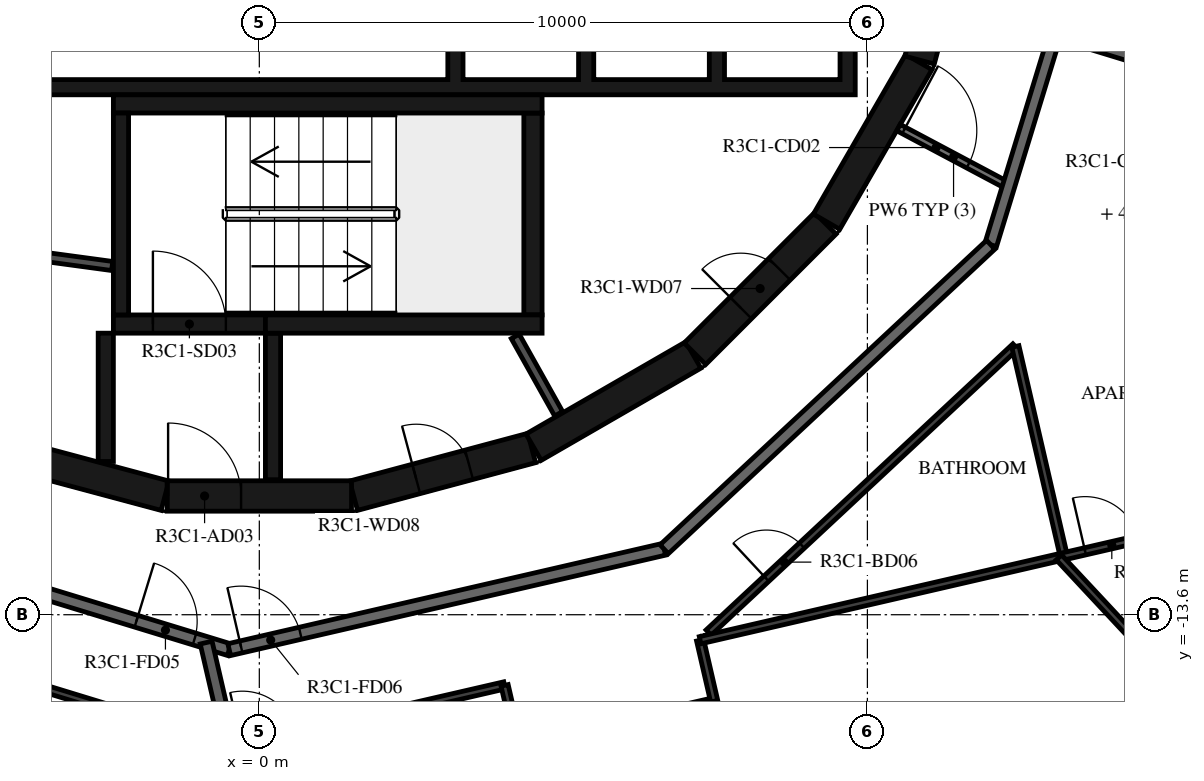
"""IFC4 building model, lengths in metres.
Left out: names, types, materials, properties, quantities, classifications, styles, units other than length and angle.
Written with IfcOpenShell. Run it as: python <this file> out.ifc"""

import sys

from ifc_helpers import new_model, si_unit, direction, frame, frame_2d, origin, place, context, subcontext, project, spatial, polyline, rectangle, outline, extrude, element, fill, save


model = new_model("IFC4")
c1 = context("Model", 3, precision=1e-05, world=origin(), true_north=direction((0.0, 1.0)))
c2 = subcontext(c1, "Body", "Model", "MODEL_VIEW")
j1 = project(units=[si_unit("LENGTHUNIT", "METRE"), si_unit("PLANEANGLEUNIT", "RADIAN")], contexts=[c1])
p1 = place(None, origin())
s1 = spatial("IfcSite", under=j1, at=p1, CompositionType="ELEMENT")
p2 = place(p1, origin())
s2 = spatial("IfcBuilding", under=s1, at=p2, CompositionType="ELEMENT")
p3 = place(p2, frame((0.0, 0.0, 137.9)))
s3 = spatial("IfcBuildingStorey", under=s2, at=p3, CompositionType="ELEMENT", Elevation=137.9)
p4 = place(p3, frame((1.55, -11.643, 0.0), z_axis=(0.0, 0.0, 1.0), x_axis=(0.965948410781, 0.258734743916, 0.0)))
e1 = element("IfcWall", 1, at=p4, inside=s3, PredefinedType="SHEAR", context=c2, shape_type="SweptSolid", body=[
    extrude(rectangle(XDim=3.033, YDim=0.5, at=frame_2d((1.516, 0.0))), origin(), (0.0, 0.0, 1.0), 3.12),
])
p5 = place(p4, frame((1.066, 0.0, 0.0)))
e2 = element("IfcOpeningElement", 2, at=p5, cuts=e1, PredefinedType="OPENING", context=c2, shape_type="SweptSolid", body=[
    extrude(rectangle(XDim=0.9, YDim=2.1, at=frame_2d((0.45, 1.05))), frame((0.0, 0.26, 0.0), z_axis=(0.0, -1.0, 0.0), x_axis=(1.0, 0.0, 0.0)), (0.0, 0.0, 1.0), 0.52),
])
p6 = place(p3, frame((4.51, -10.845, 0.0), z_axis=(0.0, 0.0, 1.0), x_axis=(0.865975092491, 0.500087131594, 0.0)))
e3 = element("IfcWall", 3, at=p6, inside=s3, PredefinedType="SHEAR", context=c2, shape_type="SweptSolid", body=[
    extrude(rectangle(XDim=3.033, YDim=0.5, at=frame_2d((1.516, 0.0))), origin(), (0.0, 0.0, 1.0), 3.12),
])
p7 = place(p3, frame((7.164, -9.308, 0.0), z_axis=(0.0, 0.0, 1.0), x_axis=(0.707106781187, 0.707106781187, 0.0)))
e4 = element("IfcWall", 4, at=p7, inside=s3, PredefinedType="SHEAR", context=c2, shape_type="SweptSolid", body=[
    extrude(rectangle(XDim=3.032, YDim=0.5, at=frame_2d((1.516, 0.0))), origin(), (0.0, 0.0, 1.0), 3.12),
])
p8 = place(p7, frame((1.066, 0.0, 0.0)))
e5 = element("IfcOpeningElement", 5, at=p8, cuts=e4, PredefinedType="OPENING", context=c2, shape_type="SweptSolid", body=[
    extrude(rectangle(XDim=0.9, YDim=2.1, at=frame_2d((0.45, 1.05))), frame((0.0, 0.26, 0.0), z_axis=(0.0, -1.0, 0.0), x_axis=(1.0, 0.0, 0.0)), (0.0, 0.0, 1.0), 0.52),
])
for number, where, z_axis, x_axis in (
    (6, (9.329, -7.137, 0.0), (0.0, 0.0, 1.0), (0.5, 0.866, 0.0)),
    (7, (10.858, -4.479, 0.0), (0.0, 0.0, 1.0), (0.259, 0.966, 0.0)),
    (8, (-4.479, -10.858, 0.0), (0.0, 0.0, 1.0), (0.966, -0.259, 0.0)),
):
    element("IfcWall", number, at=place(p3, frame(where, z_axis=z_axis, x_axis=x_axis)), inside=s3, PredefinedType="SHEAR", context=c2, shape_type="SweptSolid", body=[
        extrude(rectangle(XDim=3.033, YDim=0.5, at=frame_2d((1.516, 0.0))), origin(), (0.0, 0.0, 1.0), 3.12),
    ])
p9 = place(p3, frame((-1.516, -11.647, 0.0), z_axis=(0.0, 0.0, 1.0), x_axis=(1.0, 0.0, 0.0)))
e9 = element("IfcWall", 9, at=p9, inside=s3, PredefinedType="SHEAR", context=c2, shape_type="SweptSolid", body=[
    extrude(rectangle(XDim=3.033, YDim=0.5, at=frame_2d((1.516, 0.0))), origin(), (0.0, 0.0, 1.0), 3.12),
])
p10 = place(p9, frame((0.016, 0.0, 0.0)))
e10 = element("IfcOpeningElement", 10, at=p10, cuts=e9, PredefinedType="OPENING", context=c2, shape_type="SweptSolid", body=[
    extrude(rectangle(XDim=1.2, YDim=2.1, at=frame_2d((0.6, 1.05))), frame((0.0, 0.26, 0.0), z_axis=(0.0, -1.0, 0.0), x_axis=(1.0, 0.0, 0.0)), (0.0, 0.0, 1.0), 0.52),
])
p11 = place(p3, frame((-2.275, -8.67, 0.0), z_axis=(0.0, 0.0, 1.0), x_axis=(0.0, 1.0, 0.0)))
e11 = element("IfcWall", 11, at=p11, inside=s3, PredefinedType="SHEAR", context=c2, shape_type="SweptSolid", body=[
    extrude(rectangle(XDim=3.32, YDim=0.25, at=frame_2d((1.66, 0.0))), origin(), (0.0, 0.0, 1.0), 3.12),
])
p12 = place(p3, frame((-2.4, -5.2, 0.0), z_axis=(0.0, 0.0, 1.0), x_axis=(1.0, 0.0, 0.0)))
e12 = element("IfcWall", 12, at=p12, inside=s3, PredefinedType="SHEAR", context=c2, shape_type="SweptSolid", body=[
    extrude(rectangle(XDim=7.05, YDim=0.3, at=frame_2d((3.525, 0.0))), origin(), (0.0, 0.0, 1.0), 3.12),
])
p13 = place(p3, frame((4.5, -8.67, 0.0), z_axis=(0.0, 0.0, 1.0), x_axis=(0.0, 1.0, 0.0)))
e13 = element("IfcWall", 13, at=p13, inside=s3, PredefinedType="SHEAR", context=c2, shape_type="SweptSolid", body=[
    extrude(rectangle(XDim=3.32, YDim=0.3, at=frame_2d((1.66, 0.0))), origin(), (0.0, 0.0, 1.0), 3.12),
])
p14 = place(p3, frame((0.1, -8.82, 0.0), z_axis=(0.0, 0.0, 1.0), x_axis=(1.0, 0.0, 0.0)))
e14 = element("IfcWall", 14, at=p14, inside=s3, PredefinedType="SHEAR", context=c2, shape_type="SweptSolid", body=[
    extrude(rectangle(XDim=4.55, YDim=0.3, at=frame_2d((2.275, 0.0))), origin(), (0.0, 0.0, 1.0), 3.12),
])
p15 = place(p3, frame((-2.4, -8.82, 0.0), z_axis=(0.0, 0.0, 1.0), x_axis=(1.0, 0.0, 0.0)))
e15 = element("IfcWall", 15, at=p15, inside=s3, PredefinedType="SHEAR", context=c2, shape_type="SweptSolid", body=[
    extrude(rectangle(XDim=2.5, YDim=0.3, at=frame_2d((1.25, 0.0))), origin(), (0.0, 0.0, 1.0), 3.12),
])
p16 = place(p15, frame((0.65, 0.0, 0.0)))
e16 = element("IfcOpeningElement", 16, at=p16, cuts=e15, PredefinedType="OPENING", context=c2, shape_type="SweptSolid", body=[
    extrude(rectangle(XDim=1.2, YDim=2.1, at=frame_2d((0.6, 1.05))), frame((0.0, 0.16, 0.0), z_axis=(0.0, -1.0, 0.0), x_axis=(1.0, 0.0, 0.0)), (0.0, 0.0, 1.0), 0.32),
])
p17 = place(p3, frame((-2.525, -8.97, 0.0), z_axis=(0.0, 0.0, 1.0), x_axis=(0.0, -1.0, 0.0)))
e17 = element("IfcWall", 17, at=p17, inside=s3, PredefinedType="SHEAR", context=c2, shape_type="SweptSolid", body=[
    extrude(rectangle(XDim=2.11, YDim=0.25, at=frame_2d((1.055, 0.0))), origin(), (0.0, 0.0, 1.0), 3.12),
])
p18 = place(p3, frame((0.225, -8.97, 0.0), z_axis=(0.0, 0.0, 1.0), x_axis=(0.0, -1.0, 0.0)))
e18 = element("IfcWall", 18, at=p18, inside=s3, PredefinedType="SHEAR", context=c2, shape_type="SweptSolid", body=[
    extrude(rectangle(XDim=2.41, YDim=0.25, at=frame_2d((1.205, 0.0))), origin(), (0.0, 0.0, 1.0), 3.12),
])
p19 = place(p3, origin())
e19 = element("IfcWall", 19, at=p19, inside=s3, PredefinedType="SHEAR", context=c2, shape_type="SweptSolid", body=[
    extrude(outline(polyline([(9.8, -5.05), (9.8, -4.8), (9.8, -1.9), (9.55, -1.9), (9.55, -4.8), (7.65, -4.8), (7.65, -1.9), (7.4, -1.9), (7.4, -4.8), (5.5, -4.8), (5.5, -1.9), (5.25, -1.9), (5.25, -4.8), (3.35, -4.8), (3.35, -1.9), (3.1, -1.9), (3.1, -4.8), (-5.25, -4.8), (-5.25, -1.9), (-5.5, -1.9), (-5.5, -4.8), (-7.4, -4.8), (-7.4, -1.9), (-7.65, -1.9), (-7.65, -4.8), (-9.55, -4.8), (-9.55, -1.9), (-9.8, -1.9), (-9.8, -4.8), (-9.8, -5.05), (9.8, -5.05)])), origin(), (0.0, 0.0, 1.0), 3.12),
])
p20 = place(p3, frame((4.922, -10.296, 0.0), z_axis=(0.0, 0.0, 1.0), x_axis=(-0.48860846254, 0.872503163509, 0.0)))
e20 = element("IfcWall", 20, at=p20, inside=s3, PredefinedType="PARTITIONING", context=c2, shape_type="SweptSolid", body=[
    extrude(rectangle(XDim=1.459, YDim=0.15, at=frame_2d((0.73, 0.0))), origin(), (0.0, 0.0, 1.0), 3.12),
])
p21 = place(p3, frame((-2.42, -7.865, 0.0), z_axis=(0.0, 0.0, 1.0), x_axis=(-0.990972299108, 0.134066783362, 0.0)))
e21 = element("IfcWall", 21, at=p21, inside=s3, PredefinedType="PARTITIONING", context=c2, shape_type="SweptSolid", body=[
    extrude(rectangle(XDim=2.176, YDim=0.15, at=frame_2d((1.088, 0.0))), origin(), (0.0, 0.0, 1.0), 3.12),
])
p22 = place(p3, frame((10.511, -5.589, 0.0), z_axis=(0.0, 0.0, 1.0), x_axis=(0.882987820808, -0.469395897196, 0.0)))
e22 = element("IfcWall", 22, at=p22, inside=s3, PredefinedType="PARTITIONING", context=c2, shape_type="SweptSolid", body=[
    extrude(rectangle(XDim=2.052, YDim=0.12, at=frame_2d((1.026, 0.0))), origin(), (0.0, 0.0, 1.0), 3.12),
])
p23 = place(p22, frame((0.1, 0.0, 0.0)))
e23 = element("IfcOpeningElement", 23, at=p23, cuts=e22, PredefinedType="OPENING", context=c2, shape_type="SweptSolid", body=[
    extrude(rectangle(XDim=1.2, YDim=2.1, at=frame_2d((0.6, 1.05))), frame((0.0, 0.07, 0.0), z_axis=(0.0, -1.0, 0.0), x_axis=(1.0, 0.0, 0.0)), (0.0, 0.0, 1.0), 0.14),
])
p24 = place(p3, frame((12.028, -7.516, 0.0), z_axis=(0.0, 0.0, 1.0), x_axis=(0.292365533182, 0.956306642771, 0.0)))
e24 = element("IfcWall", 24, at=p24, inside=s3, PredefinedType="STANDARD", context=c2, shape_type="SweptSolid", body=[
    extrude(rectangle(XDim=7.342, YDim=0.2, at=frame_2d((3.671, 0.0))), origin(), (0.0, 0.0, 1.0), 3.12),
])
p25 = place(p3, frame((-7.516, -12.028, 0.0), z_axis=(0.0, 0.0, 1.0), x_axis=(0.956306642771, -0.292365533182, 0.0)))
e25 = element("IfcWall", 25, at=p25, inside=s3, PredefinedType="STANDARD", context=c2, shape_type="SweptSolid", body=[
    extrude(rectangle(XDim=7.342, YDim=0.2, at=frame_2d((3.671, 0.0))), origin(), (0.0, 0.0, 1.0), 3.12),
])
p26 = place(p25, frame((5.745, 0.0, 0.0)))
e26 = element("IfcOpeningElement", 26, at=p26, cuts=e25, PredefinedType="OPENING", context=c2, shape_type="SweptSolid", body=[
    extrude(rectangle(XDim=1.0, YDim=2.1, at=frame_2d((0.5, 1.05))), frame((0.0, 0.11, 0.0), z_axis=(0.0, -1.0, 0.0), x_axis=(1.0, 0.0, 0.0)), (0.0, 0.0, 1.0), 0.22),
])
p27 = place(p3, frame((-0.495, -14.175, 0.0), z_axis=(0.0, 0.0, 1.0), x_axis=(0.974376622151, 0.224922649383, 0.0)))
e27 = element("IfcWall", 27, at=p27, inside=s3, PredefinedType="STANDARD", context=c2, shape_type="SweptSolid", body=[
    extrude(rectangle(XDim=7.342, YDim=0.2, at=frame_2d((3.671, 0.0))), origin(), (0.0, 0.0, 1.0), 3.12),
])
p28 = place(p27, frame((0.2, 0.0, 0.0)))
e28 = element("IfcOpeningElement", 28, at=p28, cuts=e27, PredefinedType="OPENING", context=c2, shape_type="SweptSolid", body=[
    extrude(rectangle(XDim=1.0, YDim=2.1, at=frame_2d((0.5, 1.05))), frame((0.0, 0.11, 0.0), z_axis=(0.0, -1.0, 0.0), x_axis=(1.0, 0.0, 0.0)), (0.0, 0.0, 1.0), 0.22),
])
p29 = place(p3, frame((6.659, -12.523, 0.0), z_axis=(0.0, 0.0, 1.0), x_axis=(0.731350455479, 0.682001841105, 0.0)))
e29 = element("IfcWall", 29, at=p29, inside=s3, PredefinedType="STANDARD", context=c2, shape_type="SweptSolid", body=[
    extrude(rectangle(XDim=7.342, YDim=0.2, at=frame_2d((3.671, 0.0))), origin(), (0.0, 0.0, 1.0), 3.12),
])
p30 = place(p3, frame((13.095, -4.026, 0.0), z_axis=(0.0, 0.0, 1.0), x_axis=(0.956303942966, -0.292374363904, 0.0)))
e30 = element("IfcWall", 30, at=p30, inside=s3, PredefinedType="STANDARD", context=c2, shape_type="SweptSolid", body=[
    extrude(rectangle(XDim=6.567, YDim=0.2, at=frame_2d((3.284, 0.0))), origin(), (0.0, 0.0, 1.0), 3.12),
])
p31 = place(p3, frame((-0.492, -15.713, 0.0), z_axis=(0.0, 0.0, 1.0), x_axis=(-0.224974992875, 0.97436453783, 0.0)))
e31 = element("IfcWall", 31, at=p31, inside=s3, PredefinedType="STANDARD", context=c2, shape_type="SweptSolid", body=[
    extrude(rectangle(XDim=1.698, YDim=0.2, at=frame_2d((0.849, 0.0))), origin(), (0.0, 0.0, 1.0), 3.12),
])
p32 = place(p3, frame((-7.804, -13.509, 0.0), z_axis=(0.0, 0.0, 1.0), x_axis=(0.956309088343, -0.292357533772, 0.0)))
e32 = element("IfcWall", 32, at=p32, inside=s3, PredefinedType="PARTITIONING", context=c2, shape_type="SweptSolid", body=[
    extrude(rectangle(XDim=7.586, YDim=0.12, at=frame_2d((3.793, 0.0))), origin(), (0.0, 0.0, 1.0), 3.12),
])
p33 = place(p32, frame((1.006, 0.0, 0.0)))
e33 = element("IfcOpeningElement", 33, at=p33, cuts=e32, PredefinedType="OPENING", context=c2, shape_type="SweptSolid", body=[
    extrude(rectangle(XDim=0.8, YDim=2.1, at=frame_2d((0.4, 1.05))), frame((0.0, 0.07, 0.0), z_axis=(0.0, -1.0, 0.0), x_axis=(1.0, 0.0, 0.0)), (0.0, 0.0, 1.0), 0.14),
])
p34 = place(p3, frame((-14.736, -19.095, 0.0), z_axis=(0.0, 0.0, 1.0), x_axis=(0.974368335243, 0.224958545682, 0.0)))
e34 = element("IfcWall", 34, at=p34, inside=s3, PredefinedType="PARTITIONING", context=c2, shape_type="SweptSolid", body=[
    extrude(rectangle(XDim=19.263, YDim=0.12, at=frame_2d((9.632, 0.0))), origin(), (0.0, 0.0, 1.0), 3.12),
])
p35 = place(p34, frame((2.993, 0.0, 0.0)))
e35 = element("IfcOpeningElement", 35, at=p35, cuts=e34, PredefinedType="OPENING", context=c2, shape_type="SweptSolid", body=[
    extrude(rectangle(XDim=0.9, YDim=2.1, at=frame_2d((0.45, 1.05))), frame((0.0, 0.07, 0.0), z_axis=(0.0, -1.0, 0.0), x_axis=(1.0, 0.0, 0.0)), (0.0, 0.0, 1.0), 0.14),
])
p36 = place(p34, frame((6.81, 0.0, 0.0)))
e36 = element("IfcOpeningElement", 36, at=p36, cuts=e34, PredefinedType="OPENING", context=c2, shape_type="SweptSolid", body=[
    extrude(rectangle(XDim=0.9, YDim=2.1, at=frame_2d((0.45, 1.05))), frame((0.0, 0.07, 0.0), z_axis=(0.0, -1.0, 0.0), x_axis=(1.0, 0.0, 0.0)), (0.0, 0.0, 1.0), 0.14),
])
p37 = place(p34, frame((0.2, 0.0, 0.0)))
e37 = element("IfcOpeningElement", 37, at=p37, cuts=e34, PredefinedType="OPENING", context=c2, shape_type="SweptSolid", body=[
    extrude(rectangle(XDim=0.9, YDim=2.1, at=frame_2d((0.45, 1.05))), frame((0.0, 0.07, 0.0), z_axis=(0.0, -1.0, 0.0), x_axis=(1.0, 0.0, 0.0)), (0.0, 0.0, 1.0), 0.14),
])
p38 = place(p34, frame((14.839, 0.0, 0.0)))
e38 = element("IfcOpeningElement", 38, at=p38, cuts=e34, PredefinedType="OPENING", context=c2, shape_type="SweptSolid", body=[
    extrude(rectangle(XDim=0.9, YDim=2.1, at=frame_2d((0.45, 1.05))), frame((0.0, 0.07, 0.0), z_axis=(0.0, -1.0, 0.0), x_axis=(1.0, 0.0, 0.0)), (0.0, 0.0, 1.0), 0.14),
])
p39 = place(p3, frame((4.034, -14.762, 0.0), z_axis=(0.0, 0.0, 1.0), x_axis=(0.224859506699, -0.974391195695, 0.0)))
e39 = element("IfcWall", 39, at=p39, inside=s3, PredefinedType="PARTITIONING", context=c2, shape_type="SweptSolid", body=[
    extrude(rectangle(XDim=1.029, YDim=0.12, at=frame_2d((0.515, 0.0))), origin(), (0.0, 0.0, 1.0), 3.12),
])
p40 = place(p3, frame((4.265, -15.765, 0.0), z_axis=(0.0, 0.0, 1.0), x_axis=(0.974382467056, 0.22489732745, 0.0)))
e40 = element("IfcWall", 40, at=p40, inside=s3, PredefinedType="PARTITIONING", context=c2, shape_type="SweptSolid", body=[
    extrude(rectangle(XDim=3.3, YDim=0.12, at=frame_2d((1.65, 0.0))), origin(), (0.0, 0.0, 1.0), 3.12),
])
p41 = place(p3, frame((7.481, -15.022, 0.0), z_axis=(0.0, 0.0, 1.0), x_axis=(-0.225084689316, 0.974339203068, 0.0)))
e41 = element("IfcWall", 41, at=p41, inside=s3, PredefinedType="PARTITIONING", context=c2, shape_type="SweptSolid", body=[
    extrude(rectangle(XDim=1.029, YDim=0.12, at=frame_2d((0.515, 0.0))), origin(), (0.0, 0.0, 1.0), 3.12),
])
p42 = place(p3, frame((7.388, -13.894, 0.0), z_axis=(0.0, 0.0, 1.0), x_axis=(0.731339966659, 0.682013088707, 0.0)))
e42 = element("IfcWall", 42, at=p42, inside=s3, PredefinedType="PARTITIONING", context=c2, shape_type="SweptSolid", body=[
    extrude(rectangle(XDim=6.899, YDim=0.12, at=frame_2d((3.45, 0.0))), origin(), (0.0, 0.0, 1.0), 3.12),
])
p43 = place(p42, frame((1.3, 0.0, 0.0)))
e43 = element("IfcOpeningElement", 43, at=p43, cuts=e42, PredefinedType="OPENING", context=c2, shape_type="SweptSolid", body=[
    extrude(rectangle(XDim=0.8, YDim=2.1, at=frame_2d((0.4, 1.05))), frame((0.0, 0.07, 0.0), z_axis=(0.0, -1.0, 0.0), x_axis=(1.0, 0.0, 0.0)), (0.0, 0.0, 1.0), 0.14),
])
p44 = place(p3, frame((12.434, -9.189, 0.0), z_axis=(0.0, 0.0, 1.0), x_axis=(0.224924972887, -0.974376085796, 0.0)))
e44 = element("IfcWall", 44, at=p44, inside=s3, PredefinedType="PARTITIONING", context=c2, shape_type="SweptSolid", body=[
    extrude(rectangle(XDim=3.541, YDim=0.12, at=frame_2d((1.771, 0.0))), origin(), (0.0, 0.0, 1.0), 3.12),
])
p45 = place(p3, frame((7.249, -14.02, 0.0), z_axis=(0.0, 0.0, 1.0), x_axis=(0.974369514697, 0.224953437023, 0.0)))
e45 = element("IfcWall", 45, at=p45, inside=s3, PredefinedType="PARTITIONING", context=c2, shape_type="SweptSolid", body=[
    extrude(rectangle(XDim=12.149, YDim=0.12, at=frame_2d((6.074, 0.0))), origin(), (0.0, 0.0, 1.0), 3.12),
])
p46 = place(p45, frame((6.498, 0.0, 0.0)))
e46 = element("IfcOpeningElement", 46, at=p46, cuts=e45, PredefinedType="OPENING", context=c2, shape_type="SweptSolid", body=[
    extrude(rectangle(XDim=0.9, YDim=2.1, at=frame_2d((0.45, 1.05))), frame((0.0, 0.07, 0.0), z_axis=(0.0, -1.0, 0.0), x_axis=(1.0, 0.0, 0.0)), (0.0, 0.0, 1.0), 0.14),
])
p47 = place(p3, frame((15.985, -15.698, 0.0), z_axis=(0.0, 0.0, 1.0), x_axis=(-0.681979185924, 0.731371581322, 0.0)))
e47 = element("IfcWall", 47, at=p47, inside=s3, PredefinedType="PARTITIONING", context=c2, shape_type="SweptSolid", body=[
    extrude(rectangle(XDim=4.157, YDim=0.12, at=frame_2d((2.079, 0.0))), origin(), (0.0, 0.0, 1.0), 3.12),
])
p48 = place(p16, origin())
e48 = element("IfcDoor", 48, at=p48, inside=s3, OperationType="SINGLE_SWING_LEFT", PredefinedType="DOOR", context=c2, shape_type="SweptSolid", body=[
    extrude(rectangle(XDim=1.2, YDim=2.1, at=frame_2d((0.6, 1.05))), frame((0.0, 0.025, 0.0), z_axis=(0.0, -1.0, 0.0), x_axis=(1.0, 0.0, 0.0)), (0.0, 0.0, 1.0), 0.05),
])
fill(e16, e48)
p49 = place(p10, origin())
e49 = element("IfcDoor", 49, at=p49, inside=s3, OperationType="SINGLE_SWING_RIGHT", PredefinedType="DOOR", context=c2, shape_type="SweptSolid", body=[
    extrude(rectangle(XDim=1.2, YDim=2.1, at=frame_2d((0.6, 1.05))), frame((0.0, 0.025, 0.0), z_axis=(0.0, -1.0, 0.0), x_axis=(1.0, 0.0, 0.0)), (0.0, 0.0, 1.0), 0.05),
])
fill(e10, e49)
p50 = place(p8, origin())
e50 = element("IfcDoor", 50, at=p50, inside=s3, OperationType="SINGLE_SWING_RIGHT", PredefinedType="DOOR", context=c2, shape_type="SweptSolid", body=[
    extrude(rectangle(XDim=0.9, YDim=2.1, at=frame_2d((0.45, 1.05))), frame((0.0, 0.025, 0.0), z_axis=(0.0, -1.0, 0.0), x_axis=(1.0, 0.0, 0.0)), (0.0, 0.0, 1.0), 0.05),
])
fill(e5, e50)
p51 = place(p5, origin())
e51 = element("IfcDoor", 51, at=p51, inside=s3, OperationType="SINGLE_SWING_LEFT", PredefinedType="DOOR", context=c2, shape_type="SweptSolid", body=[
    extrude(rectangle(XDim=0.9, YDim=2.1, at=frame_2d((0.45, 1.05))), frame((0.0, 0.025, 0.0), z_axis=(0.0, -1.0, 0.0), x_axis=(1.0, 0.0, 0.0)), (0.0, 0.0, 1.0), 0.05),
])
fill(e2, e51)
p52 = place(p26, origin())
e52 = element("IfcDoor", 52, at=p52, inside=s3, OperationType="SINGLE_SWING_LEFT", PredefinedType="DOOR", context=c2, shape_type="SweptSolid", body=[
    extrude(rectangle(XDim=1.0, YDim=2.1, at=frame_2d((0.5, 1.05))), frame((0.0, 0.025, 0.0), z_axis=(0.0, -1.0, 0.0), x_axis=(1.0, 0.0, 0.0)), (0.0, 0.0, 1.0), 0.05),
])
fill(e26, e52)
p53 = place(p28, origin())
e53 = element("IfcDoor", 53, at=p53, inside=s3, OperationType="SINGLE_SWING_LEFT", PredefinedType="DOOR", context=c2, shape_type="SweptSolid", body=[
    extrude(rectangle(XDim=1.0, YDim=2.1, at=frame_2d((0.5, 1.05))), frame((0.0, 0.025, 0.0), z_axis=(0.0, -1.0, 0.0), x_axis=(1.0, 0.0, 0.0)), (0.0, 0.0, 1.0), 0.05),
])
fill(e28, e53)
p54 = place(p43, origin())
e54 = element("IfcDoor", 54, at=p54, inside=s3, OperationType="SINGLE_SWING_RIGHT", PredefinedType="DOOR", context=c2, shape_type="SweptSolid", body=[
    extrude(rectangle(XDim=0.8, YDim=2.1, at=frame_2d((0.4, 1.05))), frame((0.0, 0.025, 0.0), z_axis=(0.0, -1.0, 0.0), x_axis=(1.0, 0.0, 0.0)), (0.0, 0.0, 1.0), 0.05),
])
fill(e43, e54)
p55 = place(p46, origin())
e55 = element("IfcDoor", 55, at=p55, inside=s3, OperationType="SINGLE_SWING_RIGHT", PredefinedType="DOOR", context=c2, shape_type="SweptSolid", body=[
    extrude(rectangle(XDim=0.9, YDim=2.1, at=frame_2d((0.45, 1.05))), frame((0.0, 0.025, 0.0), z_axis=(0.0, -1.0, 0.0), x_axis=(1.0, 0.0, 0.0)), (0.0, 0.0, 1.0), 0.05),
])
fill(e46, e55)
p56 = place(p23, origin())
e56 = element("IfcDoor", 56, at=p56, inside=s3, OperationType="DOUBLE_DOOR_SINGLE_SWING", PredefinedType="DOOR", context=c2, shape_type="SweptSolid", body=[
    extrude(rectangle(XDim=1.2, YDim=2.1, at=frame_2d((0.6, 1.05))), frame((0.0, 0.025, 0.0), z_axis=(0.0, -1.0, 0.0), x_axis=(1.0, 0.0, 0.0)), (0.0, 0.0, 1.0), 0.05),
])
fill(e23, e56)
save(model, sys.argv[1])
